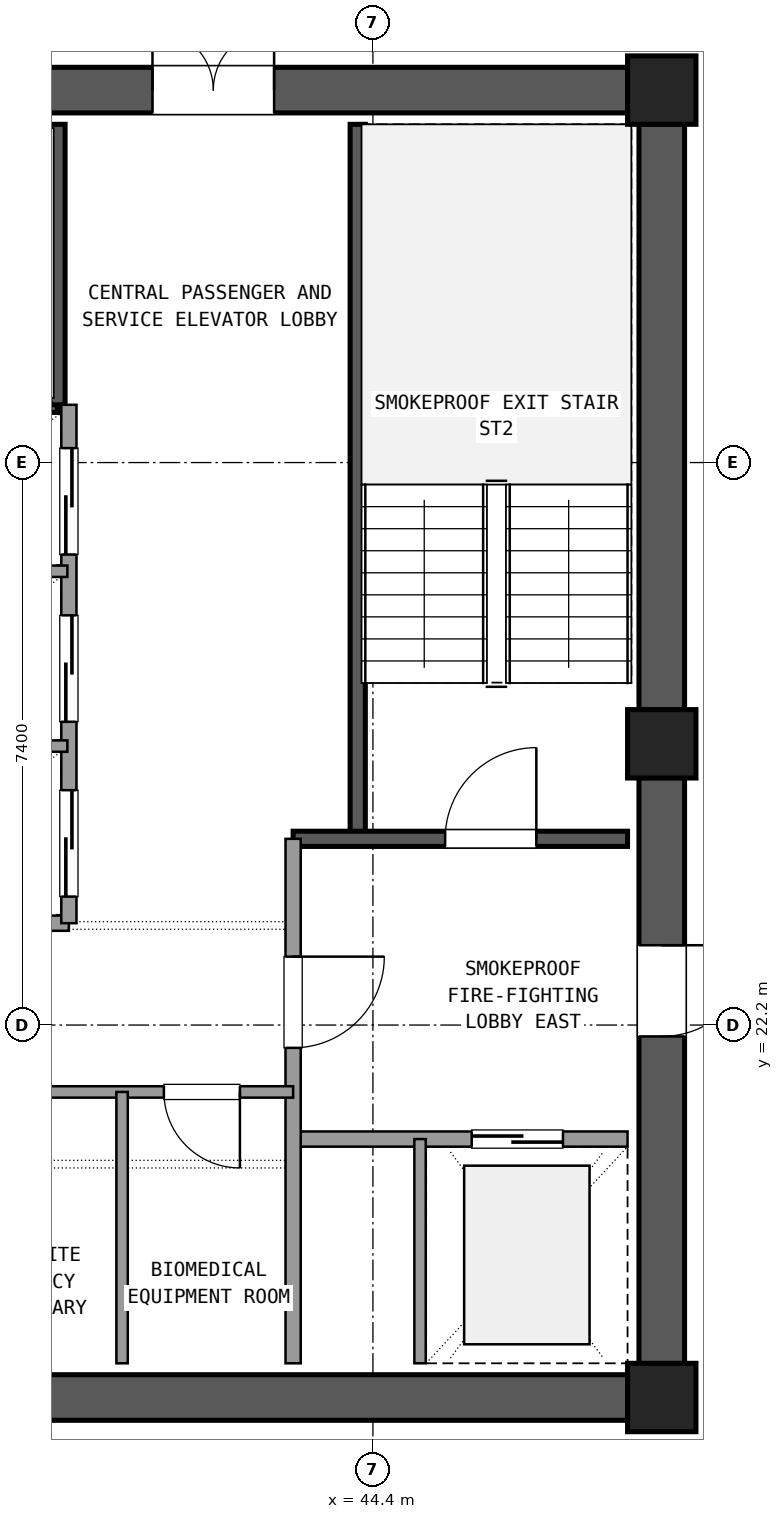
"""IFC4 building model, lengths in metres.
Left out: names, types, materials, properties, quantities, classifications, styles, units other than length and angle.
Written with IfcOpenShell. Run it as: python <this file> out.ifc"""

import sys

from ifc_helpers import new_model, si_unit, direction, frame, frame_2d, origin, origin_2d, place, context, subcontext, project, spatial, rectangle, extrude, element, fill, save


model = new_model("IFC4")
c1 = context("Model", 3, precision=1e-05, world=origin(), true_north=direction((0.0, 1.0)))
c2 = subcontext(c1, "Body", "Model", "MODEL_VIEW")
j1 = project(units=[si_unit("LENGTHUNIT", "METRE"), si_unit("PLANEANGLEUNIT", "RADIAN")], contexts=[c1])
p1 = place(None, origin())
s1 = spatial("IfcSite", under=j1, at=p1, CompositionType="ELEMENT")
p2 = place(p1, origin())
s2 = spatial("IfcBuilding", under=s1, at=p2, CompositionType="ELEMENT")
p3 = place(p2, frame((0.0, 0.0, 250.02)))
s3 = spatial("IfcBuildingStorey", under=s2, at=p3, CompositionType="ELEMENT", Elevation=250.02)
for number, where, z_axis, x_axis in (
    (1, (48.2, 17.3, 0.0), (0.0, 0.0, 1.0), (1.0, 0.0, 0.0)),
    (2, (48.2, 25.9, 0.0), (0.0, 0.0, 1.0), (1.0, 0.0, 0.0)),
    (3, (48.2, 34.5, 0.0), (0.0, 0.0, 1.0), (1.0, 0.0, 0.0)),
):
    element("IfcColumn", number, at=place(p3, frame(where, z_axis=z_axis, x_axis=x_axis)), inside=s3, PredefinedType="COLUMN", context=c2, shape_type="SweptSolid", body=[
        extrude(rectangle(XDim=0.9, YDim=0.9, at=origin_2d()), origin(), (0.0, 0.0, 1.0), 3.6),
    ])
p4 = place(p3, frame((37.445, 17.3, 0.0), z_axis=(0.0, 0.0, 1.0), x_axis=(1.0, 0.0, 0.0)))
e4 = element("IfcWall", 4, at=p4, inside=s3, PredefinedType="SHEAR", context=c2, shape_type="SweptSolid", body=[
    extrude(rectangle(XDim=10.31, YDim=0.6, at=frame_2d((5.155, 0.0))), origin(), (0.0, 0.0, 1.0), 3.32),
])
p5 = place(p3, frame((48.2, 17.745, 0.0), z_axis=(0.0, 0.0, 1.0), x_axis=(0.0, 1.0, 0.0)))
e5 = element("IfcWall", 5, at=p5, inside=s3, PredefinedType="SHEAR", context=c2, shape_type="SweptSolid", body=[
    extrude(rectangle(XDim=7.71, YDim=0.6, at=frame_2d((3.855, 0.0))), origin(), (0.0, 0.0, 1.0), 3.32),
])
p6 = place(p5, frame((4.305, 0.0, 0.0)))
e6 = element("IfcOpeningElement", 6, at=p6, cuts=e5, PredefinedType="OPENING", context=c2, shape_type="SweptSolid", body=[
    extrude(rectangle(XDim=1.2, YDim=2.15, at=frame_2d((0.6, 1.075))), frame((0.0, 0.31, 0.0), z_axis=(0.0, -1.0, 0.0), x_axis=(1.0, 0.0, 0.0)), (0.0, 0.0, 1.0), 0.62),
])
p7 = place(p3, frame((48.2, 26.345, 0.0), z_axis=(0.0, 0.0, 1.0), x_axis=(0.0, 1.0, 0.0)))
e7 = element("IfcWall", 7, at=p7, inside=s3, PredefinedType="SHEAR", context=c2, shape_type="SweptSolid", body=[
    extrude(rectangle(XDim=7.71, YDim=0.6, at=frame_2d((3.855, 0.0))), origin(), (0.0, 0.0, 1.0), 3.32),
])
p8 = place(p3, frame((47.755, 34.5, 0.0), z_axis=(0.0, 0.0, 1.0), x_axis=(-1.0, 0.0, 0.0)))
e8 = element("IfcWall", 8, at=p8, inside=s3, PredefinedType="SHEAR", context=c2, shape_type="SweptSolid", body=[
    extrude(rectangle(XDim=10.31, YDim=0.6, at=frame_2d((5.155, 0.0))), origin(), (0.0, 0.0, 1.0), 3.32),
])
p9 = place(p8, frame((4.655, 0.0, 0.0)))
e9 = element("IfcOpeningElement", 9, at=p9, cuts=e8, PredefinedType="OPENING", context=c2, shape_type="SweptSolid", body=[
    extrude(rectangle(XDim=1.6, YDim=2.2, at=frame_2d((0.8, 1.1))), frame((0.0, 0.31, 0.0), z_axis=(0.0, -1.0, 0.0), x_axis=(1.0, 0.0, 0.0)), (0.0, 0.0, 1.0), 0.62),
])
p10 = place(p3, frame((44.2, 24.65, 0.0), z_axis=(0.0, 0.0, 1.0), x_axis=(0.0, 1.0, 0.0)))
e10 = element("IfcWall", 10, at=p10, inside=s3, PredefinedType="SHEAR", context=c2, shape_type="SweptSolid", body=[
    extrude(rectangle(XDim=9.4, YDim=0.2, at=frame_2d((4.7, 0.0))), origin(), (0.0, 0.0, 1.0), 3.32),
])
p11 = place(p3, frame((43.35, 24.65, 0.0), z_axis=(0.0, 0.0, 1.0), x_axis=(1.0, 0.0, 0.0)))
e11 = element("IfcWall", 11, at=p11, inside=s3, PredefinedType="SHEAR", context=c2, shape_type="SweptSolid", body=[
    extrude(rectangle(XDim=4.4, YDim=0.2, at=frame_2d((2.2, 0.0))), origin(), (0.0, 0.0, 1.0), 3.32),
])
p12 = place(p11, frame((2.0, 0.0, 0.0)))
e12 = element("IfcOpeningElement", 12, at=p12, cuts=e11, PredefinedType="OPENING", context=c2, shape_type="SweptSolid", body=[
    extrude(rectangle(XDim=1.2, YDim=2.15, at=frame_2d((0.6, 1.075))), frame((0.0, 0.11, 0.0), z_axis=(0.0, -1.0, 0.0), x_axis=(1.0, 0.0, 0.0)), (0.0, 0.0, 1.0), 0.22),
])
p13 = place(p3, frame((30.75, 30.36, 0.0), z_axis=(0.0, 0.0, 1.0), x_axis=(1.0, 0.0, 0.0)))
e13 = element("IfcWall", 13, at=p13, inside=s3, PredefinedType="SHEAR", context=c2, shape_type="SweptSolid", body=[
    extrude(rectangle(XDim=9.5, YDim=0.2, at=frame_2d((4.75, 0.0))), origin(), (0.0, 0.0, 1.0), 3.32),
])
p14 = place(p3, frame((40.25, 30.36, 0.0), z_axis=(0.0, 0.0, 1.0), x_axis=(0.0, 1.0, 0.0)))
e14 = element("IfcWall", 14, at=p14, inside=s3, PredefinedType="SHEAR", context=c2, shape_type="SweptSolid", body=[
    extrude(rectangle(XDim=3.69, YDim=0.2, at=frame_2d((1.845, 0.0))), origin(), (0.0, 0.0, 1.0), 3.32),
])
p15 = place(p3, frame((43.35, 20.7, 0.0), z_axis=(0.0, 0.0, 1.0), x_axis=(1.0, 0.0, 0.0)))
e15 = element("IfcWall", 15, at=p15, inside=s3, PredefinedType="SOLIDWALL", context=c2, shape_type="SweptSolid", body=[
    extrude(rectangle(XDim=4.4, YDim=0.2, at=frame_2d((2.2, 0.0))), origin(), (0.0, 0.0, 1.0), 2.61),
])
p16 = place(p15, frame((2.35, 0.0, 0.0)))
e16 = element("IfcOpeningElement", 16, at=p16, cuts=e15, PredefinedType="OPENING", context=c2, shape_type="SweptSolid", body=[
    extrude(rectangle(XDim=1.2, YDim=2.15, at=frame_2d((0.6, 1.075))), frame((0.0, 0.11, 0.0), z_axis=(0.0, -1.0, 0.0), x_axis=(1.0, 0.0, 0.0)), (0.0, 0.0, 1.0), 0.22),
])
p17 = place(p3, frame((43.35, 17.75, 0.0), z_axis=(0.0, 0.0, 1.0), x_axis=(0.0, 1.0, 0.0)))
e17 = element("IfcWall", 17, at=p17, inside=s3, PredefinedType="SOLIDWALL", context=c2, shape_type="SweptSolid", body=[
    extrude(rectangle(XDim=6.9, YDim=0.2, at=frame_2d((3.45, 0.0))), origin(), (0.0, 0.0, 1.0), 2.61),
])
p18 = place(p17, frame((4.15, 0.0, 0.0)))
e18 = element("IfcOpeningElement", 18, at=p18, cuts=e17, PredefinedType="OPENING", context=c2, shape_type="SweptSolid", body=[
    extrude(rectangle(XDim=1.2, YDim=2.15, at=frame_2d((0.6, 1.075))), frame((0.0, 0.11, 0.0), z_axis=(0.0, -1.0, 0.0), x_axis=(1.0, 0.0, 0.0)), (0.0, 0.0, 1.0), 0.22),
])
p19 = place(p3, frame((45.02, 17.75, 0.0), z_axis=(0.0, 0.0, 1.0), x_axis=(0.0, 1.0, 0.0)))
e19 = element("IfcWall", 19, at=p19, inside=s3, PredefinedType="PARTITIONING", context=c2, shape_type="SweptSolid", body=[
    extrude(rectangle(XDim=2.95, YDim=0.15, at=frame_2d((1.475, 0.0))), origin(), (0.0, 0.0, 1.0), 2.61),
])
p20 = place(p3, frame((37.25, 21.32, 0.0), z_axis=(0.0, 0.0, 1.0), x_axis=(1.0, 0.0, 0.0)))
e20 = element("IfcWall", 20, at=p20, inside=s3, PredefinedType="PARTITIONING", context=c2, shape_type="SweptSolid", body=[
    extrude(rectangle(XDim=6.1, YDim=0.15, at=frame_2d((3.05, 0.0))), origin(), (0.0, 0.0, 1.0), 2.61),
])
p21 = place(p20, frame((0.55, 0.0, 0.0)))
e21 = element("IfcOpeningElement", 21, at=p21, cuts=e20, PredefinedType="OPENING", context=c2, shape_type="SweptSolid", body=[
    extrude(rectangle(XDim=1.0, YDim=2.15, at=frame_2d((0.5, 1.075))), frame((0.0, 0.085, 0.0), z_axis=(0.0, -1.0, 0.0), x_axis=(1.0, 0.0, 0.0)), (0.0, 0.0, 1.0), 0.17),
])
p22 = place(p20, frame((4.4, 0.0, 0.0)))
e22 = element("IfcOpeningElement", 22, at=p22, cuts=e20, PredefinedType="OPENING", context=c2, shape_type="SweptSolid", body=[
    extrude(rectangle(XDim=1.0, YDim=2.15, at=frame_2d((0.5, 1.075))), frame((0.0, 0.085, 0.0), z_axis=(0.0, -1.0, 0.0), x_axis=(1.0, 0.0, 0.0)), (0.0, 0.0, 1.0), 0.17),
])
p23 = place(p3, frame((41.1, 17.75, 0.0), z_axis=(0.0, 0.0, 1.0), x_axis=(0.0, 1.0, 0.0)))
e23 = element("IfcWall", 23, at=p23, inside=s3, PredefinedType="PARTITIONING", context=c2, shape_type="SweptSolid", body=[
    extrude(rectangle(XDim=3.57, YDim=0.15, at=frame_2d((1.785, 0.0))), origin(), (0.0, 0.0, 1.0), 2.61),
])
p24 = place(p3, frame((37.35, 23.54, 0.0), z_axis=(0.0, 0.0, 1.0), x_axis=(1.0, 0.0, 0.0)))
e24 = element("IfcWall", 24, at=p24, inside=s3, PredefinedType="SOLIDWALL", context=c2, shape_type="SweptSolid", body=[
    extrude(rectangle(XDim=3.05, YDim=0.2, at=frame_2d((1.525, 0.0))), origin(), (0.0, 0.0, 1.0), 2.61),
])
p25 = place(p3, frame((40.4, 23.54, 0.0), z_axis=(0.0, 0.0, 1.0), x_axis=(0.0, 1.0, 0.0)))
e25 = element("IfcWall", 25, at=p25, inside=s3, PredefinedType="SOLIDWALL", context=c2, shape_type="SweptSolid", body=[
    extrude(rectangle(XDim=6.82, YDim=0.2, at=frame_2d((3.41, 0.0))), origin(), (0.0, 0.0, 1.0), 2.61),
])
p26 = place(p25, frame((0.35, 0.0, 0.0)))
e26 = element("IfcOpeningElement", 26, at=p26, cuts=e25, PredefinedType="OPENING", context=c2, shape_type="SweptSolid", body=[
    extrude(rectangle(XDim=1.4, YDim=2.2, at=frame_2d((0.7, 1.1))), frame((0.0, 0.11, 0.0), z_axis=(0.0, -1.0, 0.0), x_axis=(1.0, 0.0, 0.0)), (0.0, 0.0, 1.0), 0.22),
])
p27 = place(p25, frame((2.65, 0.0, 0.0)))
e27 = element("IfcOpeningElement", 27, at=p27, cuts=e25, PredefinedType="OPENING", context=c2, shape_type="SweptSolid", body=[
    extrude(rectangle(XDim=1.4, YDim=2.2, at=frame_2d((0.7, 1.1))), frame((0.0, 0.11, 0.0), z_axis=(0.0, -1.0, 0.0), x_axis=(1.0, 0.0, 0.0)), (0.0, 0.0, 1.0), 0.22),
])
p28 = place(p25, frame((4.85, 0.0, 0.0)))
e28 = element("IfcOpeningElement", 28, at=p28, cuts=e25, PredefinedType="OPENING", context=c2, shape_type="SweptSolid", body=[
    extrude(rectangle(XDim=1.4, YDim=2.2, at=frame_2d((0.7, 1.1))), frame((0.0, 0.11, 0.0), z_axis=(0.0, -1.0, 0.0), x_axis=(1.0, 0.0, 0.0)), (0.0, 0.0, 1.0), 0.22),
])
for number, where, z_axis, x_axis in (
    (29, (37.37, 25.87, 0.0), (0.0, 0.0, 1.0), (1.0, 0.0, 0.0)),
    (30, (37.37, 28.17, 0.0), (0.0, 0.0, 1.0), (1.0, 0.0, 0.0)),
):
    element("IfcWall", number, at=place(p3, frame(where, z_axis=z_axis, x_axis=x_axis)), inside=s3, PredefinedType="PARTITIONING", context=c2, shape_type="SweptSolid", body=[
        extrude(rectangle(XDim=3.01, YDim=0.15, at=frame_2d((1.505, 0.0))), origin(), (0.0, 0.0, 1.0), 2.61),
    ])
p29 = place(p12, origin())
e31 = element("IfcDoor", 31, at=p29, inside=s3, OperationType="SINGLE_SWING_RIGHT", PredefinedType="DOOR", context=c2, shape_type="SweptSolid", body=[
    extrude(rectangle(XDim=1.2, YDim=2.15, at=frame_2d((0.6, 1.075))), frame((0.0, 0.025, 0.0), z_axis=(0.0, -1.0, 0.0), x_axis=(1.0, 0.0, 0.0)), (0.0, 0.0, 1.0), 0.05),
])
fill(e12, e31)
p30 = place(p16, origin())
e32 = element("IfcDoor", 32, at=p30, inside=s3, OperationType="SLIDING_TO_RIGHT", PredefinedType="DOOR", context=c2, shape_type="SweptSolid", body=[
    extrude(rectangle(XDim=1.2, YDim=2.15, at=frame_2d((0.6, 1.075))), frame((0.0, 0.025, 0.0), z_axis=(0.0, -1.0, 0.0), x_axis=(1.0, 0.0, 0.0)), (0.0, 0.0, 1.0), 0.05),
])
fill(e16, e32)
p31 = place(p18, frame((1.2, 0.0, 0.0), z_axis=(0.0, 0.0, 1.0), x_axis=(-1.0, 0.0, 0.0)))
e33 = element("IfcDoor", 33, at=p31, inside=s3, OperationType="SINGLE_SWING_RIGHT", PredefinedType="DOOR", context=c2, shape_type="SweptSolid", body=[
    extrude(rectangle(XDim=1.2, YDim=2.15, at=frame_2d((0.6, 1.075))), frame((0.0, 0.025, 0.0), z_axis=(0.0, -1.0, 0.0), x_axis=(1.0, 0.0, 0.0)), (0.0, 0.0, 1.0), 0.05),
])
fill(e18, e33)
p32 = place(p6, frame((1.2, 0.0, 0.0), z_axis=(0.0, 0.0, 1.0), x_axis=(-1.0, 0.0, 0.0)))
e34 = element("IfcDoor", 34, at=p32, inside=s3, OperationType="SINGLE_SWING_RIGHT", PredefinedType="DOOR", context=c2, shape_type="SweptSolid", body=[
    extrude(rectangle(XDim=1.2, YDim=2.15, at=frame_2d((0.6, 1.075))), frame((0.0, 0.025, 0.0), z_axis=(0.0, -1.0, 0.0), x_axis=(1.0, 0.0, 0.0)), (0.0, 0.0, 1.0), 0.05),
])
fill(e6, e34)
p33 = place(p9, frame((1.6, 0.0, 0.0), z_axis=(0.0, 0.0, 1.0), x_axis=(-1.0, 0.0, 0.0)))
e35 = element("IfcDoor", 35, at=p33, inside=s3, OperationType="DOUBLE_DOOR_SINGLE_SWING", PredefinedType="DOOR", context=c2, shape_type="SweptSolid", body=[
    extrude(rectangle(XDim=1.6, YDim=2.2, at=frame_2d((0.8, 1.1))), frame((0.0, 0.025, 0.0), z_axis=(0.0, -1.0, 0.0), x_axis=(1.0, 0.0, 0.0)), (0.0, 0.0, 1.0), 0.05),
])
fill(e9, e35)
p34 = place(p22, frame((1.0, 0.0, 0.0), z_axis=(0.0, 0.0, 1.0), x_axis=(-1.0, 0.0, 0.0)))
e36 = element("IfcDoor", 36, at=p34, inside=s3, OperationType="SINGLE_SWING_RIGHT", PredefinedType="DOOR", context=c2, shape_type="SweptSolid", body=[
    extrude(rectangle(XDim=1.0, YDim=2.15, at=frame_2d((0.5, 1.075))), frame((0.0, 0.025, 0.0), z_axis=(0.0, -1.0, 0.0), x_axis=(1.0, 0.0, 0.0)), (0.0, 0.0, 1.0), 0.05),
])
fill(e22, e36)
p35 = place(p26, origin())
e37 = element("IfcDoor", 37, at=p35, inside=s3, OperationType="SLIDING_TO_LEFT", PredefinedType="DOOR", context=c2, shape_type="SweptSolid", body=[
    extrude(rectangle(XDim=1.4, YDim=2.2, at=frame_2d((0.7, 1.1))), frame((0.0, 0.025, 0.0), z_axis=(0.0, -1.0, 0.0), x_axis=(1.0, 0.0, 0.0)), (0.0, 0.0, 1.0), 0.05),
])
fill(e26, e37)
p36 = place(p27, origin())
e38 = element("IfcDoor", 38, at=p36, inside=s3, OperationType="SLIDING_TO_LEFT", PredefinedType="DOOR", context=c2, shape_type="SweptSolid", body=[
    extrude(rectangle(XDim=1.4, YDim=2.2, at=frame_2d((0.7, 1.1))), frame((0.0, 0.025, 0.0), z_axis=(0.0, -1.0, 0.0), x_axis=(1.0, 0.0, 0.0)), (0.0, 0.0, 1.0), 0.05),
])
fill(e27, e38)
p37 = place(p28, origin())
e39 = element("IfcDoor", 39, at=p37, inside=s3, OperationType="SLIDING_TO_RIGHT", PredefinedType="DOOR", context=c2, shape_type="SweptSolid", body=[
    extrude(rectangle(XDim=1.4, YDim=2.2, at=frame_2d((0.7, 1.1))), frame((0.0, 0.025, 0.0), z_axis=(0.0, -1.0, 0.0), x_axis=(1.0, 0.0, 0.0)), (0.0, 0.0, 1.0), 0.05),
])
fill(e28, e39)
save(model, sys.argv[1])
